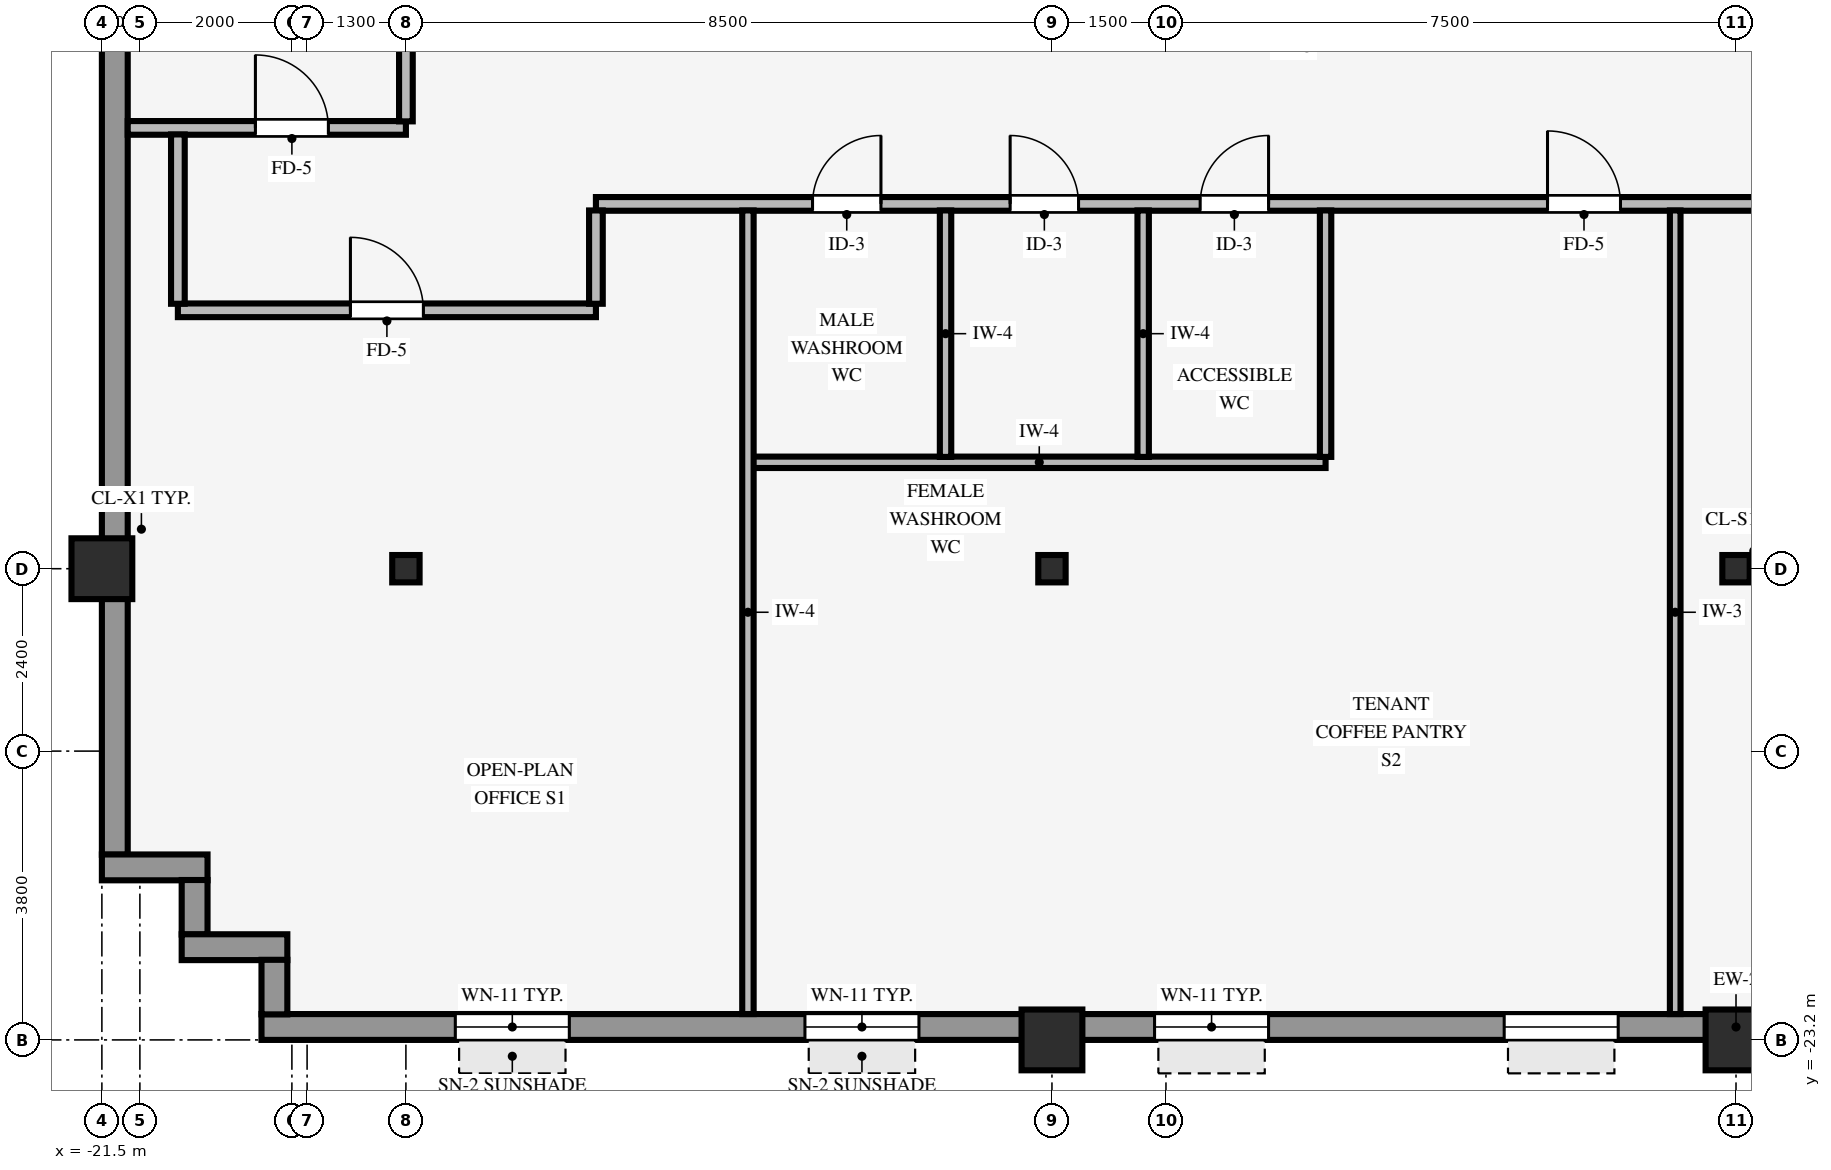
"""IFC4 building model, lengths in metres.
Left out: names, types, materials, properties, quantities, classifications, styles, units other than length and angle.
Written with IfcOpenShell. Run it as: python <this file> out.ifc"""

import sys

from ifc_helpers import new_model, si_unit, direction, frame, frame_2d, origin, origin_2d, place, context, subcontext, project, spatial, rectangle, hollow_rectangle, i_section, extrude, source, transform, mapped, element, fill, save


model = new_model("IFC4")
c1 = context("Model", 3, precision=1e-05, world=origin(), true_north=direction((0.0, 1.0)))
c2 = subcontext(c1, "Body", "Model", "MODEL_VIEW")
j1 = project(units=[si_unit("LENGTHUNIT", "METRE"), si_unit("PLANEANGLEUNIT", "RADIAN")], contexts=[c1])
p1 = place(None, origin())
s1 = spatial("IfcSite", under=j1, at=p1, CompositionType="ELEMENT")
p2 = place(p1, origin())
s2 = spatial("IfcBuilding", under=s1, at=p2, CompositionType="ELEMENT")
p3 = place(p2, frame((0.0, 0.0, 78.7)))
s3 = spatial("IfcBuildingStorey", under=s2, at=p3, CompositionType="ELEMENT", Elevation=78.7)
for number, where, z_axis, x_axis in (
    (1, (-21.5, -17.0, 0.0), (0.0, 0.0, 1.0), (1.0, 0.0, 0.0)),
    (2, (-9.0, -23.2, 0.0), (0.0, 0.0, 1.0), (1.0, 0.0, 0.0)),
    (3, (0.0, -23.2, 0.0), (0.0, 0.0, 1.0), (1.0, 0.0, 0.0)),
):
    element("IfcColumn", number, at=place(p3, frame(where, z_axis=z_axis, x_axis=x_axis)), inside=s3, PredefinedType="COLUMN", context=c2, shape_type="SweptSolid", body=[
        extrude(hollow_rectangle(XDim=0.8, YDim=0.8, WallThickness=0.055, InnerFilletRadius=0.055, OuterFilletRadius=0.11, at=origin_2d()), origin(), (0.0, 0.0, 1.0), 3.37),
    ])
for number, where, z_axis, x_axis in (
    (4, (0.0, -17.0, 0.0), (0.0, 0.0, 1.0), (1.0, 0.0, 0.0)),
    (5, (-17.5, -17.0, 0.0), (0.0, 0.0, 1.0), (1.0, 0.0, 0.0)),
    (6, (-9.0, -17.0, 0.0), (0.0, 0.0, 1.0), (1.0, 0.0, 0.0)),
):
    element("IfcColumn", number, at=place(p3, frame(where, z_axis=z_axis, x_axis=x_axis)), inside=s3, PredefinedType="COLUMN", context=c2, shape_type="SweptSolid", body=[
        extrude(i_section(OverallWidth=0.36, OverallDepth=0.36, WebThickness=0.021, FlangeThickness=0.021, FilletRadius=0.018, at=origin_2d()), origin(), (0.0, 0.0, 1.0), 3.37),
    ])
p4 = place(p3, frame((-19.4, -23.03, 0.0), z_axis=(0.0, 0.0, 1.0), x_axis=(1.0, 0.0, 0.0)))
e7 = element("IfcWall", 7, at=p4, inside=s3, PredefinedType="STANDARD", context=c2, shape_type="SweptSolid", body=[
    extrude(rectangle(XDim=38.8, YDim=0.34, at=frame_2d((19.4, 0.0))), origin(), (0.0, 0.0, 1.0), 2.705),
])
p5 = place(p4, frame((2.55, 0.0, 0.8)))
e8 = element("IfcOpeningElement", 8, at=p5, cuts=e7, PredefinedType="OPENING", context=c2, shape_type="SweptSolid", body=[
    extrude(rectangle(XDim=1.5, YDim=1.6, at=frame_2d((0.75, 0.8))), frame((0.0, 0.18, 0.0), z_axis=(0.0, -1.0, 0.0), x_axis=(1.0, 0.0, 0.0)), (0.0, 0.0, 1.0), 0.36),
])
p6 = place(p4, frame((7.15, 0.0, 0.8)))
e9 = element("IfcOpeningElement", 9, at=p6, cuts=e7, PredefinedType="OPENING", context=c2, shape_type="SweptSolid", body=[
    extrude(rectangle(XDim=1.5, YDim=1.6, at=frame_2d((0.75, 0.8))), frame((0.0, 0.18, 0.0), z_axis=(0.0, -1.0, 0.0), x_axis=(1.0, 0.0, 0.0)), (0.0, 0.0, 1.0), 0.36),
])
p7 = place(p4, frame((11.75, 0.0, 0.8)))
e10 = element("IfcOpeningElement", 10, at=p7, cuts=e7, PredefinedType="OPENING", context=c2, shape_type="SweptSolid", body=[
    extrude(rectangle(XDim=1.5, YDim=1.6, at=frame_2d((0.75, 0.8))), frame((0.0, 0.18, 0.0), z_axis=(0.0, -1.0, 0.0), x_axis=(1.0, 0.0, 0.0)), (0.0, 0.0, 1.0), 0.36),
])
p8 = place(p4, frame((16.35, 0.0, 0.8)))
e11 = element("IfcOpeningElement", 11, at=p8, cuts=e7, PredefinedType="OPENING", context=c2, shape_type="SweptSolid", body=[
    extrude(rectangle(XDim=1.5, YDim=1.6, at=frame_2d((0.75, 0.8))), frame((0.0, 0.18, 0.0), z_axis=(0.0, -1.0, 0.0), x_axis=(1.0, 0.0, 0.0)), (0.0, 0.0, 1.0), 0.36),
])
p9 = place(p4, frame((20.95, 0.0, 0.8)))
e12 = element("IfcOpeningElement", 12, at=p9, cuts=e7, PredefinedType="OPENING", context=c2, shape_type="SweptSolid", body=[
    extrude(rectangle(XDim=1.5, YDim=1.6, at=frame_2d((0.75, 0.8))), frame((0.0, 0.18, 0.0), z_axis=(0.0, -1.0, 0.0), x_axis=(1.0, 0.0, 0.0)), (0.0, 0.0, 1.0), 0.36),
])
p10 = place(p4, frame((25.55, 0.0, 0.8)))
e13 = element("IfcOpeningElement", 13, at=p10, cuts=e7, PredefinedType="OPENING", context=c2, shape_type="SweptSolid", body=[
    extrude(rectangle(XDim=1.5, YDim=1.6, at=frame_2d((0.75, 0.8))), frame((0.0, 0.18, 0.0), z_axis=(0.0, -1.0, 0.0), x_axis=(1.0, 0.0, 0.0)), (0.0, 0.0, 1.0), 0.36),
])
p11 = place(p4, frame((30.15, 0.0, 0.8)))
e14 = element("IfcOpeningElement", 14, at=p11, cuts=e7, PredefinedType="OPENING", context=c2, shape_type="SweptSolid", body=[
    extrude(rectangle(XDim=1.5, YDim=1.6, at=frame_2d((0.75, 0.8))), frame((0.0, 0.18, 0.0), z_axis=(0.0, -1.0, 0.0), x_axis=(1.0, 0.0, 0.0)), (0.0, 0.0, 1.0), 0.36),
])
p12 = place(p4, frame((34.75, 0.0, 0.8)))
e15 = element("IfcOpeningElement", 15, at=p12, cuts=e7, PredefinedType="OPENING", context=c2, shape_type="SweptSolid", body=[
    extrude(rectangle(XDim=1.5, YDim=1.6, at=frame_2d((0.75, 0.8))), frame((0.0, 0.18, 0.0), z_axis=(0.0, -1.0, 0.0), x_axis=(1.0, 0.0, 0.0)), (0.0, 0.0, 1.0), 0.36),
])
p13 = place(p3, frame((-21.33, -20.764, 0.0), z_axis=(0.0, 0.0, 1.0), x_axis=(0.0, 1.0, 0.0)))
e16 = element("IfcWall", 16, at=p13, inside=s3, PredefinedType="STANDARD", context=c2, shape_type="SweptSolid", body=[
    extrude(rectangle(XDim=41.528, YDim=0.34, at=frame_2d((20.764, 0.0))), origin(), (0.0, 0.0, 1.0), 2.705),
])
p14 = place(p13, frame((15.364, 0.0, 0.0)))
e17 = element("IfcOpeningElement", 17, at=p14, cuts=e16, PredefinedType="OPENING", context=c2, shape_type="SweptSolid", body=[
    extrude(rectangle(XDim=1.05, YDim=2.1, at=frame_2d((0.525, 1.05))), frame((0.0, 0.18, 0.0), z_axis=(0.0, -1.0, 0.0), x_axis=(1.0, 0.0, 0.0)), (0.0, 0.0, 1.0), 0.36),
])
p15 = place(p13, frame((12.202, 0.0, 0.8)))
e18 = element("IfcOpeningElement", 18, at=p15, cuts=e16, PredefinedType="OPENING", context=c2, shape_type="SweptSolid", body=[
    extrude(rectangle(XDim=2.3, YDim=1.62, at=frame_2d((1.15, 0.81))), frame((0.0, 0.18, 0.0), z_axis=(0.0, -1.0, 0.0), x_axis=(1.0, 0.0, 0.0)), (0.0, 0.0, 1.0), 0.36),
])
p16 = place(p13, frame((17.144, 0.0, 0.8)))
e19 = element("IfcOpeningElement", 19, at=p16, cuts=e16, PredefinedType="OPENING", context=c2, shape_type="SweptSolid", body=[
    extrude(rectangle(XDim=2.3, YDim=1.62, at=frame_2d((1.15, 0.81))), frame((0.0, 0.18, 0.0), z_axis=(0.0, -1.0, 0.0), x_axis=(1.0, 0.0, 0.0)), (0.0, 0.0, 1.0), 0.36),
])
p17 = place(p13, frame((22.084, 0.0, 0.8)))
e20 = element("IfcOpeningElement", 20, at=p17, cuts=e16, PredefinedType="OPENING", context=c2, shape_type="SweptSolid", body=[
    extrude(rectangle(XDim=2.3, YDim=1.62, at=frame_2d((1.15, 0.81))), frame((0.0, 0.18, 0.0), z_axis=(0.0, -1.0, 0.0), x_axis=(1.0, 0.0, 0.0)), (0.0, 0.0, 1.0), 0.36),
])
p18 = place(p13, frame((27.025, 0.0, 0.8)))
e21 = element("IfcOpeningElement", 21, at=p18, cuts=e16, PredefinedType="OPENING", context=c2, shape_type="SweptSolid", body=[
    extrude(rectangle(XDim=2.3, YDim=1.62, at=frame_2d((1.15, 0.81))), frame((0.0, 0.18, 0.0), z_axis=(0.0, -1.0, 0.0), x_axis=(1.0, 0.0, 0.0)), (0.0, 0.0, 1.0), 0.36),
])
p19 = place(p3, frame((-21.5, -20.93, 0.0), z_axis=(0.0, 0.0, 1.0), x_axis=(1.0, 0.0, 0.0)))
e22 = element("IfcWall", 22, at=p19, inside=s3, PredefinedType="STANDARD", context=c2, shape_type="SweptSolid", body=[
    extrude(rectangle(XDim=1.39, YDim=0.34, at=frame_2d((0.695, 0.0))), origin(), (0.0, 0.0, 1.0), 3.36),
])
p20 = place(p3, frame((-20.28, -21.814, 0.0), z_axis=(0.0, 0.0, 1.0), x_axis=(0.0, 1.0, 0.0)))
e23 = element("IfcWall", 23, at=p20, inside=s3, PredefinedType="STANDARD", context=c2, shape_type="SweptSolid", body=[
    extrude(rectangle(XDim=0.718, YDim=0.34, at=frame_2d((0.359, 0.0))), origin(), (0.0, 0.0, 1.0), 3.36),
])
p21 = place(p3, frame((-20.45, -21.98, 0.0), z_axis=(0.0, 0.0, 1.0), x_axis=(1.0, 0.0, 0.0)))
e24 = element("IfcWall", 24, at=p21, inside=s3, PredefinedType="STANDARD", context=c2, shape_type="SweptSolid", body=[
    extrude(rectangle(XDim=1.39, YDim=0.34, at=frame_2d((0.695, 0.0))), origin(), (0.0, 0.0, 1.0), 3.36),
])
p22 = place(p3, frame((-19.23, -22.864, 0.0), z_axis=(0.0, 0.0, 1.0), x_axis=(0.0, 1.0, 0.0)))
e25 = element("IfcWall", 25, at=p22, inside=s3, PredefinedType="STANDARD", context=c2, shape_type="SweptSolid", body=[
    extrude(rectangle(XDim=0.718, YDim=0.34, at=frame_2d((0.359, 0.0))), origin(), (0.0, 0.0, 1.0), 3.36),
])
p23 = place(p3, frame((-12.934, -15.6, 0.0), z_axis=(0.0, 0.0, 1.0), x_axis=(1.0, 0.0, 0.0)))
e26 = element("IfcWall", 26, at=p23, inside=s3, PredefinedType="PARTITIONING", context=c2, shape_type="SweptSolid", body=[
    extrude(rectangle(XDim=7.534, YDim=0.15, at=frame_2d((3.767, 0.0))), origin(), (0.0, 0.0, 1.0), 3.36),
])
p24 = place(p3, frame((-20.5, -13.6, 0.0), z_axis=(0.0, 0.0, 1.0), x_axis=(1.0, 0.0, 0.0)))
e27 = element("IfcWall", 27, at=p24, inside=s3, PredefinedType="PARTITIONING", context=c2, shape_type="SweptSolid", body=[
    extrude(rectangle(XDim=5.5, YDim=0.18, at=frame_2d((2.75, 0.0))), origin(), (0.0, 0.0, 1.0), 2.942),
])
p25 = place(p24, frame((2.27, 0.0, 0.0)))
e28 = element("IfcOpeningElement", 28, at=p25, cuts=e27, PredefinedType="OPENING", context=c2, shape_type="SweptSolid", body=[
    extrude(rectangle(XDim=0.96, YDim=2.1, at=frame_2d((0.48, 1.05))), frame((0.0, 0.1, 0.0), z_axis=(0.0, -1.0, 0.0), x_axis=(1.0, 0.0, 0.0)), (0.0, 0.0, 1.0), 0.2),
])
p26 = place(p3, frame((-15.0, -12.2, 0.0), z_axis=(0.0, 0.0, 1.0), x_axis=(1.0, 0.0, 0.0)))
e29 = element("IfcWall", 29, at=p26, inside=s3, PredefinedType="PARTITIONING", context=c2, shape_type="SweptSolid", body=[
    extrude(rectangle(XDim=30.0, YDim=0.18, at=frame_2d((15.0, 0.0))), origin(), (0.0, 0.0, 1.0), 3.36),
])
p27 = place(p26, frame((19.07, 0.0, 0.0)))
e30 = element("IfcOpeningElement", 30, at=p27, cuts=e29, PredefinedType="OPENING", context=c2, shape_type="SweptSolid", body=[
    extrude(rectangle(XDim=0.96, YDim=2.1, at=frame_2d((0.48, 1.05))), frame((0.0, 0.1, 0.0), z_axis=(0.0, -1.0, 0.0), x_axis=(1.0, 0.0, 0.0)), (0.0, 0.0, 1.0), 0.2),
])
p28 = place(p26, frame((5.45, 0.0, 0.0)))
e31 = element("IfcOpeningElement", 31, at=p28, cuts=e29, PredefinedType="OPENING", context=c2, shape_type="SweptSolid", body=[
    extrude(rectangle(XDim=0.9, YDim=2.1, at=frame_2d((0.45, 1.05))), frame((0.0, 0.1, 0.0), z_axis=(0.0, -1.0, 0.0), x_axis=(1.0, 0.0, 0.0)), (0.0, 0.0, 1.0), 0.2),
])
p29 = place(p26, frame((2.85, 0.0, 0.0)))
e32 = element("IfcOpeningElement", 32, at=p29, cuts=e29, PredefinedType="OPENING", context=c2, shape_type="SweptSolid", body=[
    extrude(rectangle(XDim=0.9, YDim=2.1, at=frame_2d((0.45, 1.05))), frame((0.0, 0.1, 0.0), z_axis=(0.0, -1.0, 0.0), x_axis=(1.0, 0.0, 0.0)), (0.0, 0.0, 1.0), 0.2),
])
p30 = place(p26, frame((12.52, 0.0, 0.0)))
e33 = element("IfcOpeningElement", 33, at=p30, cuts=e29, PredefinedType="OPENING", context=c2, shape_type="SweptSolid", body=[
    extrude(rectangle(XDim=0.96, YDim=2.1, at=frame_2d((0.48, 1.05))), frame((0.0, 0.1, 0.0), z_axis=(0.0, -1.0, 0.0), x_axis=(1.0, 0.0, 0.0)), (0.0, 0.0, 1.0), 0.2),
])
p31 = place(p26, frame((7.95, 0.0, 0.0)))
e34 = element("IfcOpeningElement", 34, at=p31, cuts=e29, PredefinedType="OPENING", context=c2, shape_type="SweptSolid", body=[
    extrude(rectangle(XDim=0.9, YDim=2.1, at=frame_2d((0.45, 1.05))), frame((0.0, 0.1, 0.0), z_axis=(0.0, -1.0, 0.0), x_axis=(1.0, 0.0, 0.0)), (0.0, 0.0, 1.0), 0.2),
])
p32 = place(p3, frame((-21.16, -11.2, 0.0), z_axis=(0.0, 0.0, 1.0), x_axis=(1.0, 0.0, 0.0)))
e35 = element("IfcWall", 35, at=p32, inside=s3, PredefinedType="PARTITIONING", context=c2, shape_type="SweptSolid", body=[
    extrude(rectangle(XDim=3.66, YDim=0.18, at=frame_2d((1.83, 0.0))), origin(), (0.0, 0.0, 1.0), 3.36),
])
p33 = place(p32, frame((1.68, 0.0, 0.0)))
e36 = element("IfcOpeningElement", 36, at=p33, cuts=e35, PredefinedType="OPENING", context=c2, shape_type="SweptSolid", body=[
    extrude(rectangle(XDim=0.96, YDim=2.1, at=frame_2d((0.48, 1.05))), frame((0.0, 0.1, 0.0), z_axis=(0.0, -1.0, 0.0), x_axis=(1.0, 0.0, 0.0)), (0.0, 0.0, 1.0), 0.2),
])
p34 = place(p3, frame((-20.5, -13.514, 0.0), z_axis=(0.0, 0.0, 1.0), x_axis=(0.0, 1.0, 0.0)))
e37 = element("IfcWall", 37, at=p34, inside=s3, PredefinedType="PARTITIONING", context=c2, shape_type="SweptSolid", body=[
    extrude(rectangle(XDim=2.228, YDim=0.18, at=frame_2d((1.114, 0.0))), origin(), (0.0, 0.0, 1.0), 3.36),
])
p35 = place(p3, frame((-17.5, -11.114, 0.0), z_axis=(0.0, 0.0, 1.0), x_axis=(0.0, 1.0, 0.0)))
e38 = element("IfcWall", 38, at=p35, inside=s3, PredefinedType="PARTITIONING", context=c2, shape_type="SweptSolid", body=[
    extrude(rectangle(XDim=0.968, YDim=0.18, at=frame_2d((0.484, 0.0))), origin(), (0.0, 0.0, 1.0), 2.738),
])
p36 = place(p3, frame((-15.0, -13.514, 0.0), z_axis=(0.0, 0.0, 1.0), x_axis=(0.0, 1.0, 0.0)))
e39 = element("IfcWall", 39, at=p36, inside=s3, PredefinedType="PARTITIONING", context=c2, shape_type="SweptSolid", body=[
    extrude(rectangle(XDim=1.228, YDim=0.18, at=frame_2d((0.614, 0.0))), origin(), (0.0, 0.0, 1.0), 3.36),
])
p37 = place(p3, frame((-13.0, -22.86, 0.0), z_axis=(0.0, 0.0, 1.0), x_axis=(0.0, 1.0, 0.0)))
e40 = element("IfcWall", 40, at=p37, inside=s3, PredefinedType="PARTITIONING", context=c2, shape_type="SweptSolid", body=[
    extrude(rectangle(XDim=10.574, YDim=0.15, at=frame_2d((5.287, 0.0))), origin(), (0.0, 0.0, 1.0), 3.36),
])
for number, where, z_axis, x_axis in (
    (41, (-10.4, -15.529, 0.0), (0.0, 0.0, 1.0), (0.0, 1.0, 0.0)),
    (42, (-7.8, -15.529, 0.0), (0.0, 0.0, 1.0), (0.0, 1.0, 0.0)),
    (43, (-5.4, -15.529, 0.0), (0.0, 0.0, 1.0), (0.0, 1.0, 0.0)),
):
    element("IfcWall", number, at=place(p3, frame(where, z_axis=z_axis, x_axis=x_axis)), inside=s3, PredefinedType="PARTITIONING", context=c2, shape_type="SweptSolid", body=[
        extrude(rectangle(XDim=3.243, YDim=0.15, at=frame_2d((1.622, 0.0))), origin(), (0.0, 0.0, 1.0), 3.36),
    ])
p38 = place(p3, frame((-0.8, -22.86, 0.0), z_axis=(0.0, 0.0, 1.0), x_axis=(0.0, 1.0, 0.0)))
e44 = element("IfcWall", 44, at=p38, inside=s3, PredefinedType="PARTITIONING", context=c2, shape_type="SweptSolid", body=[
    extrude(rectangle(XDim=10.574, YDim=0.14, at=frame_2d((5.287, 0.0))), origin(), (0.0, 0.0, 1.0), 3.36),
])
m1 = source(origin(), c2, "Body", "SweptSolid", [
    extrude(rectangle(XDim=1.5, YDim=1.6, at=frame_2d((0.75, 0.8))), frame((0.0, 0.03, 0.0), z_axis=(0.0, -1.0, 0.0), x_axis=(1.0, 0.0, 0.0)), (0.0, 0.0, 1.0), 0.06),
])
p39 = place(p5, origin())
e45 = element("IfcWindow", 45, at=p39, inside=s3, PartitioningType="SINGLE_PANEL", PredefinedType="WINDOW", context=c2, shape_type="MappedRepresentation", body=[
    mapped(m1, transform((0.0, 0.0, 0.0), scale=1.0)),
])
fill(e8, e45)
p40 = place(p6, origin())
e46 = element("IfcWindow", 46, at=p40, inside=s3, PartitioningType="SINGLE_PANEL", PredefinedType="WINDOW", context=c2, shape_type="MappedRepresentation", body=[
    mapped(m1, transform((0.0, 0.0, 0.0), scale=1.0)),
])
fill(e9, e46)
p41 = place(p7, origin())
e47 = element("IfcWindow", 47, at=p41, inside=s3, PartitioningType="SINGLE_PANEL", PredefinedType="WINDOW", context=c2, shape_type="MappedRepresentation", body=[
    mapped(m1, transform((0.0, 0.0, 0.0), scale=1.0)),
])
fill(e10, e47)
p42 = place(p8, origin())
e48 = element("IfcWindow", 48, at=p42, inside=s3, PartitioningType="SINGLE_PANEL", PredefinedType="WINDOW", context=c2, shape_type="MappedRepresentation", body=[
    mapped(m1, transform((0.0, 0.0, 0.0), scale=1.0)),
])
fill(e11, e48)
m2 = source(origin(), c2, "Body", "SweptSolid", [
    extrude(rectangle(XDim=0.96, YDim=2.1, at=frame_2d((0.48, 1.05))), frame((0.0, 0.025, 0.0), z_axis=(0.0, -1.0, 0.0), x_axis=(1.0, 0.0, 0.0)), (0.0, 0.0, 1.0), 0.05),
])
p43 = place(p25, origin())
e49 = element("IfcDoor", 49, at=p43, inside=s3, OperationType="SINGLE_SWING_LEFT", PredefinedType="DOOR", context=c2, shape_type="MappedRepresentation", body=[
    mapped(m2, transform((0.0, 0.0, 0.0), scale=1.0)),
])
fill(e28, e49)
p44 = place(p33, origin())
e50 = element("IfcDoor", 50, at=p44, inside=s3, OperationType="SINGLE_SWING_LEFT", PredefinedType="DOOR", context=c2, shape_type="MappedRepresentation", body=[
    mapped(m2, transform((0.0, 0.0, 0.0), scale=1.0)),
])
fill(e36, e50)
m3 = source(origin(), c2, "Body", "SweptSolid", [
    extrude(rectangle(XDim=0.9, YDim=2.1, at=frame_2d((0.45, 1.05))), frame((0.0, 0.025, 0.0), z_axis=(0.0, -1.0, 0.0), x_axis=(1.0, 0.0, 0.0)), (0.0, 0.0, 1.0), 0.05),
])
p45 = place(p28, origin())
e51 = element("IfcDoor", 51, at=p45, inside=s3, OperationType="SINGLE_SWING_LEFT", PredefinedType="DOOR", context=c2, shape_type="MappedRepresentation", body=[
    mapped(m3, transform((0.0, 0.0, 0.0), scale=1.0)),
])
fill(e31, e51)
p46 = place(p29, origin())
e52 = element("IfcDoor", 52, at=p46, inside=s3, OperationType="SINGLE_SWING_RIGHT", PredefinedType="DOOR", context=c2, shape_type="MappedRepresentation", body=[
    mapped(m3, transform((0.0, 0.0, 0.0), scale=1.0)),
])
fill(e32, e52)
p47 = place(p30, origin())
e53 = element("IfcDoor", 53, at=p47, inside=s3, OperationType="SINGLE_SWING_LEFT", PredefinedType="DOOR", context=c2, shape_type="MappedRepresentation", body=[
    mapped(m2, transform((0.0, 0.0, 0.0), scale=1.0)),
])
fill(e33, e53)
p48 = place(p31, origin())
e54 = element("IfcDoor", 54, at=p48, inside=s3, OperationType="SINGLE_SWING_RIGHT", PredefinedType="DOOR", context=c2, shape_type="MappedRepresentation", body=[
    mapped(m3, transform((0.0, 0.0, 0.0), scale=1.0)),
])
fill(e34, e54)
save(model, sys.argv[1])
